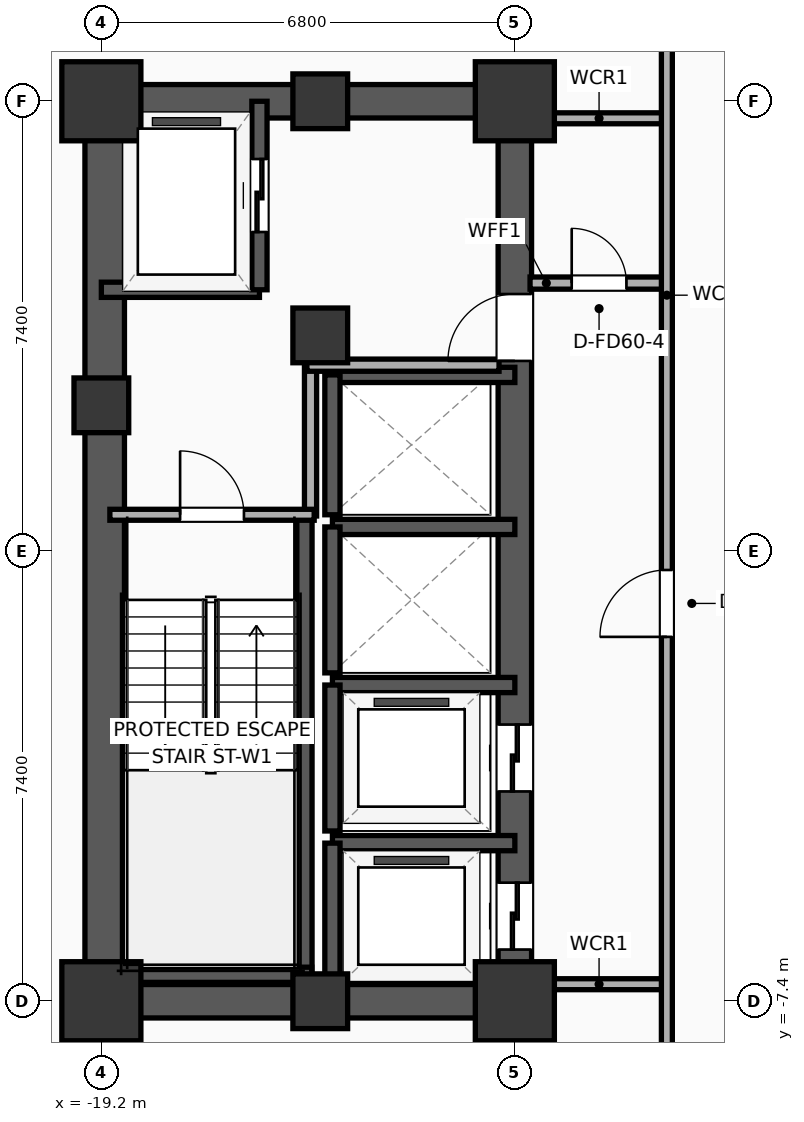
"""IFC4 building model, lengths in metres.
Left out: names, types, materials, properties, quantities, classifications, styles, units other than length and angle.
Written with IfcOpenShell. Run it as: python <this file> out.ifc"""

import sys

from ifc_helpers import new_model, si_unit, direction, frame, frame_2d, origin, origin_2d, place, context, subcontext, project, spatial, rectangle, extrude, element, fill, save


model = new_model("IFC4")
c1 = context("Model", 3, precision=1e-05, world=origin(), true_north=direction((0.0, 1.0)))
c2 = subcontext(c1, "Body", "Model", "MODEL_VIEW")
j1 = project(units=[si_unit("LENGTHUNIT", "METRE"), si_unit("PLANEANGLEUNIT", "RADIAN")], contexts=[c1])
p1 = place(None, origin())
s1 = spatial("IfcSite", under=j1, at=p1, CompositionType="ELEMENT")
p2 = place(p1, origin())
s2 = spatial("IfcBuilding", under=s1, at=p2, CompositionType="ELEMENT")
p3 = place(p2, frame((0.0, 0.0, 128.7)))
s3 = spatial("IfcBuildingStorey", under=s2, at=p3, CompositionType="ELEMENT", Elevation=128.7)
p4 = place(p3, frame((-19.2, -7.4, 0.0), z_axis=(0.0, 0.0, 1.0), x_axis=(1.0, 0.0, 0.0)))
e1 = element("IfcColumn", 1, at=p4, inside=s3, PredefinedType="COLUMN", context=c2, shape_type="SweptSolid", body=[
    extrude(rectangle(XDim=1.3, YDim=1.3, at=origin_2d()), origin(), (0.0, 0.0, 1.0), 3.9),
])
p5 = place(p3, frame((-19.2, 2.4, 0.0), z_axis=(0.0, 0.0, 1.0), x_axis=(1.0, 0.0, 0.0)))
e2 = element("IfcColumn", 2, at=p5, inside=s3, PredefinedType="COLUMN", context=c2, shape_type="SweptSolid", body=[
    extrude(rectangle(XDim=0.9, YDim=0.9, at=origin_2d()), origin(), (0.0, 0.0, 1.0), 3.9),
])
p6 = place(p3, frame((-19.2, 7.4, 0.0), z_axis=(0.0, 0.0, 1.0), x_axis=(1.0, 0.0, 0.0)))
e3 = element("IfcColumn", 3, at=p6, inside=s3, PredefinedType="COLUMN", context=c2, shape_type="SweptSolid", body=[
    extrude(rectangle(XDim=1.3, YDim=1.3, at=origin_2d()), origin(), (0.0, 0.0, 1.0), 3.9),
])
for number, where, z_axis, x_axis in (
    (4, (-15.6, -7.4, 0.0), (0.0, 0.0, 1.0), (1.0, 0.0, 0.0)),
    (5, (-15.6, 7.4, 0.0), (0.0, 0.0, 1.0), (1.0, 0.0, 0.0)),
):
    element("IfcColumn", number, at=place(p3, frame(where, z_axis=z_axis, x_axis=x_axis)), inside=s3, PredefinedType="COLUMN", context=c2, shape_type="SweptSolid", body=[
        extrude(rectangle(XDim=0.9, YDim=0.9, at=origin_2d()), origin(), (0.0, 0.0, 1.0), 3.9),
    ])
p7 = place(p3, frame((-12.4, -7.4, 0.0), z_axis=(0.0, 0.0, 1.0), x_axis=(1.0, 0.0, 0.0)))
e6 = element("IfcColumn", 6, at=p7, inside=s3, PredefinedType="COLUMN", context=c2, shape_type="SweptSolid", body=[
    extrude(rectangle(XDim=1.3, YDim=1.3, at=origin_2d()), origin(), (0.0, 0.0, 1.0), 3.9),
])
p8 = place(p3, frame((-15.6, 3.55, 0.0), z_axis=(0.0, 0.0, 1.0), x_axis=(1.0, 0.0, 0.0)))
e7 = element("IfcColumn", 7, at=p8, inside=s3, PredefinedType="COLUMN", context=c2, shape_type="SweptSolid", body=[
    extrude(rectangle(XDim=0.9, YDim=0.9, at=origin_2d()), origin(), (0.0, 0.0, 1.0), 3.9),
])
p9 = place(p3, frame((-12.4, 7.4, 0.0), z_axis=(0.0, 0.0, 1.0), x_axis=(1.0, 0.0, 0.0)))
e8 = element("IfcColumn", 8, at=p9, inside=s3, PredefinedType="COLUMN", context=c2, shape_type="SweptSolid", body=[
    extrude(rectangle(XDim=1.3, YDim=1.3, at=origin_2d()), origin(), (0.0, 0.0, 1.0), 3.9),
])
for number, where, z_axis, x_axis in (
    (9, (-19.475, -7.4, 0.0), (0.0, 0.0, 1.0), (1.0, 0.0, 0.0)),
    (10, (-19.475, 7.4, 0.0), (0.0, 0.0, 1.0), (1.0, 0.0, 0.0)),
):
    element("IfcWall", number, at=place(p3, frame(where, z_axis=z_axis, x_axis=x_axis)), inside=s3, PredefinedType="SHEAR", context=c2, shape_type="SweptSolid", body=[
        extrude(rectangle(XDim=7.35, YDim=0.55, at=frame_2d((3.675, 0.0))), origin(), (0.0, 0.0, 1.0), 3.65),
    ])
p10 = place(p3, frame((-19.145, -7.4, 0.0), z_axis=(0.0, 0.0, 1.0), x_axis=(0.0, 1.0, 0.0)))
e11 = element("IfcWall", 11, at=p10, inside=s3, PredefinedType="SHEAR", context=c2, shape_type="SweptSolid", body=[
    extrude(rectangle(XDim=14.8, YDim=0.65, at=frame_2d((7.4, 0.0))), origin(), (0.0, 0.0, 1.0), 3.65),
])
p11 = place(p3, frame((-12.4, -7.4, 0.0), z_axis=(0.0, 0.0, 1.0), x_axis=(0.0, 1.0, 0.0)))
e12 = element("IfcWall", 12, at=p11, inside=s3, PredefinedType="SHEAR", context=c2, shape_type="SweptSolid", body=[
    extrude(rectangle(XDim=14.8, YDim=0.55, at=frame_2d((7.4, 0.0))), origin(), (0.0, 0.0, 1.0), 3.65),
])
p12 = place(p11, frame((0.85, 0.0, 0.0)))
e13 = element("IfcOpeningElement", 13, at=p12, cuts=e12, PredefinedType="OPENING", context=c2, shape_type="SweptSolid", body=[
    extrude(rectangle(XDim=1.1, YDim=2.05, at=frame_2d((0.55, 1.025))), frame((0.0, 0.285, 0.0), z_axis=(0.0, -1.0, 0.0), x_axis=(1.0, 0.0, 0.0)), (0.0, 0.0, 1.0), 0.57),
])
p13 = place(p11, frame((3.45, 0.0, 0.0)))
e14 = element("IfcOpeningElement", 14, at=p13, cuts=e12, PredefinedType="OPENING", context=c2, shape_type="SweptSolid", body=[
    extrude(rectangle(XDim=1.1, YDim=2.05, at=frame_2d((0.55, 1.025))), frame((0.0, 0.285, 0.0), z_axis=(0.0, -1.0, 0.0), x_axis=(1.0, 0.0, 0.0)), (0.0, 0.0, 1.0), 0.57),
])
p14 = place(p11, frame((10.53, 0.0, 0.0)))
e15 = element("IfcOpeningElement", 15, at=p14, cuts=e12, PredefinedType="OPENING", context=c2, shape_type="SweptSolid", body=[
    extrude(rectangle(XDim=1.1, YDim=2.05, at=frame_2d((0.55, 1.025))), frame((0.0, 0.285, 0.0), z_axis=(0.0, -1.0, 0.0), x_axis=(1.0, 0.0, 0.0)), (0.0, 0.0, 1.0), 0.57),
])
p15 = place(p3, frame((-15.86, -7.085, 0.0), z_axis=(0.0, 0.0, 1.0), x_axis=(0.0, 1.0, 0.0)))
e16 = element("IfcWall", 16, at=p15, inside=s3, PredefinedType="SOLIDWALL", context=c2, shape_type="SweptSolid", body=[
    extrude(rectangle(XDim=7.685, YDim=0.25, at=frame_2d((3.843, 0.0))), origin(), (0.0, 0.0, 1.0), 3.65),
])
p16 = place(p3, frame((-19.2, -6.965, 0.0), z_axis=(0.0, 0.0, 1.0), x_axis=(1.0, 0.0, 0.0)))
e17 = element("IfcWall", 17, at=p16, inside=s3, PredefinedType="SOLIDWALL", context=c2, shape_type="SweptSolid", body=[
    extrude(rectangle(XDim=3.46, YDim=0.25, at=frame_2d((1.73, 0.0))), origin(), (0.0, 0.0, 1.0), 3.65),
])
p17 = place(p3, frame((-19.2, 4.3, 0.0), z_axis=(0.0, 0.0, 1.0), x_axis=(1.0, 0.0, 0.0)))
e18 = element("IfcWall", 18, at=p17, inside=s3, PredefinedType="SOLIDWALL", context=c2, shape_type="SweptSolid", body=[
    extrude(rectangle(XDim=2.6, YDim=0.25, at=frame_2d((1.3, 0.0))), origin(), (0.0, 0.0, 1.0), 3.65),
])
p18 = place(p3, frame((-16.6, 4.3, 0.0), z_axis=(0.0, 0.0, 1.0), x_axis=(0.0, 1.0, 0.0)))
e19 = element("IfcWall", 19, at=p18, inside=s3, PredefinedType="SOLIDWALL", context=c2, shape_type="SweptSolid", body=[
    extrude(rectangle(XDim=3.1, YDim=0.25, at=frame_2d((1.55, 0.0))), origin(), (0.0, 0.0, 1.0), 3.65),
])
p19 = place(p18, frame((0.95, 0.0, 0.0)))
e20 = element("IfcOpeningElement", 20, at=p19, cuts=e19, PredefinedType="OPENING", context=c2, shape_type="SweptSolid", body=[
    extrude(rectangle(XDim=1.2, YDim=2.05, at=frame_2d((0.6, 1.025))), frame((0.0, 0.135, 0.0), z_axis=(0.0, -1.0, 0.0), x_axis=(1.0, 0.0, 0.0)), (0.0, 0.0, 1.0), 0.27),
])
p20 = place(p3, frame((-12.4, -4.8, 0.0), z_axis=(0.0, 0.0, 1.0), x_axis=(-1.0, 0.0, 0.0)))
e21 = element("IfcWall", 21, at=p20, inside=s3, PredefinedType="SOLIDWALL", context=c2, shape_type="SweptSolid", body=[
    extrude(rectangle(XDim=3.0, YDim=0.25, at=frame_2d((1.5, 0.0))), origin(), (0.0, 0.0, 1.0), 3.65),
])
p21 = place(p3, frame((-15.4, -4.8, 0.0), z_axis=(0.0, 0.0, 1.0), x_axis=(0.0, -1.0, 0.0)))
e22 = element("IfcWall", 22, at=p21, inside=s3, PredefinedType="SOLIDWALL", context=c2, shape_type="SweptSolid", body=[
    extrude(rectangle(XDim=2.6, YDim=0.25, at=frame_2d((1.3, 0.0))), origin(), (0.0, 0.0, 1.0), 3.65),
])
p22 = place(p3, frame((-12.4, -2.2, 0.0), z_axis=(0.0, 0.0, 1.0), x_axis=(-1.0, 0.0, 0.0)))
e23 = element("IfcWall", 23, at=p22, inside=s3, PredefinedType="SOLIDWALL", context=c2, shape_type="SweptSolid", body=[
    extrude(rectangle(XDim=3.0, YDim=0.25, at=frame_2d((1.5, 0.0))), origin(), (0.0, 0.0, 1.0), 3.65),
])
p23 = place(p3, frame((-15.4, -2.2, 0.0), z_axis=(0.0, 0.0, 1.0), x_axis=(0.0, -1.0, 0.0)))
e24 = element("IfcWall", 24, at=p23, inside=s3, PredefinedType="SOLIDWALL", context=c2, shape_type="SweptSolid", body=[
    extrude(rectangle(XDim=2.4, YDim=0.25, at=frame_2d((1.2, 0.0))), origin(), (0.0, 0.0, 1.0), 3.65),
])
p24 = place(p3, frame((-12.4, 0.4, 0.0), z_axis=(0.0, 0.0, 1.0), x_axis=(-1.0, 0.0, 0.0)))
e25 = element("IfcWall", 25, at=p24, inside=s3, PredefinedType="SOLIDWALL", context=c2, shape_type="SweptSolid", body=[
    extrude(rectangle(XDim=3.0, YDim=0.25, at=frame_2d((1.5, 0.0))), origin(), (0.0, 0.0, 1.0), 3.65),
])
p25 = place(p3, frame((-15.4, 0.4, 0.0), z_axis=(0.0, 0.0, 1.0), x_axis=(0.0, -1.0, 0.0)))
e26 = element("IfcWall", 26, at=p25, inside=s3, PredefinedType="SOLIDWALL", context=c2, shape_type="SweptSolid", body=[
    extrude(rectangle(XDim=2.4, YDim=0.25, at=frame_2d((1.2, 0.0))), origin(), (0.0, 0.0, 1.0), 3.65),
])
p26 = place(p3, frame((-12.4, 2.9, 0.0), z_axis=(0.0, 0.0, 1.0), x_axis=(-1.0, 0.0, 0.0)))
e27 = element("IfcWall", 27, at=p26, inside=s3, PredefinedType="SOLIDWALL", context=c2, shape_type="SweptSolid", body=[
    extrude(rectangle(XDim=3.0, YDim=0.25, at=frame_2d((1.5, 0.0))), origin(), (0.0, 0.0, 1.0), 3.65),
])
p27 = place(p3, frame((-15.4, 2.9, 0.0), z_axis=(0.0, 0.0, 1.0), x_axis=(0.0, -1.0, 0.0)))
e28 = element("IfcWall", 28, at=p27, inside=s3, PredefinedType="SOLIDWALL", context=c2, shape_type="SweptSolid", body=[
    extrude(rectangle(XDim=2.3, YDim=0.25, at=frame_2d((1.15, 0.0))), origin(), (0.0, 0.0, 1.0), 3.65),
])
p28 = place(p3, frame((-15.76, 0.58, 0.0), z_axis=(0.0, 0.0, 1.0), x_axis=(0.0, 1.0, 0.0)))
e29 = element("IfcWall", 29, at=p28, inside=s3, PredefinedType="PARTITIONING", context=c2, shape_type="SweptSolid", body=[
    extrude(rectangle(XDim=2.52, YDim=0.2, at=frame_2d((1.26, 0.0))), origin(), (0.0, 0.0, 1.0), 3.65),
])
p29 = place(p3, frame((-15.82, 3.06, 0.0), z_axis=(0.0, 0.0, 1.0), x_axis=(1.0, 0.0, 0.0)))
e30 = element("IfcWall", 30, at=p29, inside=s3, PredefinedType="PARTITIONING", context=c2, shape_type="SweptSolid", body=[
    extrude(rectangle(XDim=3.16, YDim=0.2, at=frame_2d((1.58, 0.0))), origin(), (0.0, 0.0, 1.0), 3.65),
])
p30 = place(p3, frame((-19.06, 0.6, 0.0), z_axis=(0.0, 0.0, 1.0), x_axis=(1.0, 0.0, 0.0)))
e31 = element("IfcWall", 31, at=p30, inside=s3, PredefinedType="PARTITIONING", context=c2, shape_type="SweptSolid", body=[
    extrude(rectangle(XDim=3.36, YDim=0.18, at=frame_2d((1.68, 0.0))), origin(), (0.0, 0.0, 1.0), 3.65),
])
p31 = place(p30, frame((1.155, 0.0, 0.0)))
e32 = element("IfcOpeningElement", 32, at=p31, cuts=e31, PredefinedType="OPENING", context=c2, shape_type="SweptSolid", body=[
    extrude(rectangle(XDim=1.05, YDim=2.05, at=frame_2d((0.525, 1.025))), frame((0.0, 0.1, 0.0), z_axis=(0.0, -1.0, 0.0), x_axis=(1.0, 0.0, 0.0)), (0.0, 0.0, 1.0), 0.2),
])
p32 = place(p3, frame((-12.15, 4.41, 0.0), z_axis=(0.0, 0.0, 1.0), x_axis=(1.0, 0.0, 0.0)))
e33 = element("IfcWall", 33, at=p32, inside=s3, PredefinedType="PARTITIONING", context=c2, shape_type="SweptSolid", body=[
    extrude(rectangle(XDim=2.27, YDim=0.2, at=frame_2d((1.135, 0.0))), origin(), (0.0, 0.0, 1.0), 3.65),
])
p33 = place(p32, frame((0.685, 0.0, 0.0)))
e34 = element("IfcOpeningElement", 34, at=p33, cuts=e33, PredefinedType="OPENING", context=c2, shape_type="SweptSolid", body=[
    extrude(rectangle(XDim=0.9, YDim=2.05, at=frame_2d((0.45, 1.025))), frame((0.0, 0.11, 0.0), z_axis=(0.0, -1.0, 0.0), x_axis=(1.0, 0.0, 0.0)), (0.0, 0.0, 1.0), 0.22),
])
for number, where, z_axis, x_axis in (
    (35, (-12.15, 7.12, 0.0), (0.0, 0.0, 1.0), (1.0, 0.0, 0.0)),
    (36, (-12.15, -7.12, 0.0), (0.0, 0.0, 1.0), (1.0, 0.0, 0.0)),
):
    element("IfcWall", number, at=place(p3, frame(where, z_axis=z_axis, x_axis=x_axis)), inside=s3, PredefinedType="PARTITIONING", context=c2, shape_type="SweptSolid", body=[
        extrude(rectangle(XDim=2.27, YDim=0.18, at=frame_2d((1.135, 0.0))), origin(), (0.0, 0.0, 1.0), 3.65),
    ])
p34 = place(p3, frame((-9.9, -8.58, 0.0), z_axis=(0.0, 0.0, 1.0), x_axis=(0.0, 1.0, 0.0)))
e37 = element("IfcWall", 37, at=p34, inside=s3, PredefinedType="PARTITIONING", context=c2, shape_type="SweptSolid", body=[
    extrude(rectangle(XDim=17.16, YDim=0.18, at=frame_2d((8.58, 0.0))), origin(), (0.0, 0.0, 1.0), 3.65),
])
p35 = place(p34, frame((7.172, 0.0, 0.0)))
e38 = element("IfcOpeningElement", 38, at=p35, cuts=e37, PredefinedType="OPENING", context=c2, shape_type="SweptSolid", body=[
    extrude(rectangle(XDim=1.1, YDim=2.05, at=frame_2d((0.55, 1.025))), frame((0.0, 0.1, 0.0), z_axis=(0.0, -1.0, 0.0), x_axis=(1.0, 0.0, 0.0)), (0.0, 0.0, 1.0), 0.2),
])
p36 = place(p19, origin())
e39 = element("IfcDoor", 39, at=p36, inside=s3, OperationType="SLIDING_TO_LEFT", PredefinedType="DOOR", context=c2, shape_type="SweptSolid", body=[
    extrude(rectangle(XDim=1.2, YDim=2.05, at=frame_2d((0.6, 1.025))), frame((0.0, 0.025, 0.0), z_axis=(0.0, -1.0, 0.0), x_axis=(1.0, 0.0, 0.0)), (0.0, 0.0, 1.0), 0.05),
])
fill(e20, e39)
p37 = place(p12, origin())
e40 = element("IfcDoor", 40, at=p37, inside=s3, OperationType="SLIDING_TO_LEFT", PredefinedType="DOOR", context=c2, shape_type="SweptSolid", body=[
    extrude(rectangle(XDim=1.1, YDim=2.05, at=frame_2d((0.55, 1.025))), frame((0.0, 0.025, 0.0), z_axis=(0.0, -1.0, 0.0), x_axis=(1.0, 0.0, 0.0)), (0.0, 0.0, 1.0), 0.05),
])
fill(e13, e40)
p38 = place(p13, origin())
e41 = element("IfcDoor", 41, at=p38, inside=s3, OperationType="SLIDING_TO_LEFT", PredefinedType="DOOR", context=c2, shape_type="SweptSolid", body=[
    extrude(rectangle(XDim=1.1, YDim=2.05, at=frame_2d((0.55, 1.025))), frame((0.0, 0.025, 0.0), z_axis=(0.0, -1.0, 0.0), x_axis=(1.0, 0.0, 0.0)), (0.0, 0.0, 1.0), 0.05),
])
fill(e14, e41)
p39 = place(p31, origin())
e42 = element("IfcDoor", 42, at=p39, inside=s3, OperationType="SINGLE_SWING_LEFT", PredefinedType="DOOR", context=c2, shape_type="SweptSolid", body=[
    extrude(rectangle(XDim=1.05, YDim=2.05, at=frame_2d((0.525, 1.025))), frame((0.0, 0.025, 0.0), z_axis=(0.0, -1.0, 0.0), x_axis=(1.0, 0.0, 0.0)), (0.0, 0.0, 1.0), 0.05),
])
fill(e32, e42)
p40 = place(p33, origin())
e43 = element("IfcDoor", 43, at=p40, inside=s3, OperationType="SINGLE_SWING_LEFT", PredefinedType="DOOR", context=c2, shape_type="SweptSolid", body=[
    extrude(rectangle(XDim=0.9, YDim=2.05, at=frame_2d((0.45, 1.025))), frame((0.0, 0.025, 0.0), z_axis=(0.0, -1.0, 0.0), x_axis=(1.0, 0.0, 0.0)), (0.0, 0.0, 1.0), 0.05),
])
fill(e34, e43)
p41 = place(p35, origin())
e44 = element("IfcDoor", 44, at=p41, inside=s3, OperationType="SINGLE_SWING_LEFT", PredefinedType="DOOR", context=c2, shape_type="SweptSolid", body=[
    extrude(rectangle(XDim=1.1, YDim=2.05, at=frame_2d((0.55, 1.025))), frame((0.0, 0.025, 0.0), z_axis=(0.0, -1.0, 0.0), x_axis=(1.0, 0.0, 0.0)), (0.0, 0.0, 1.0), 0.05),
])
fill(e38, e44)
p42 = place(p14, origin())
e45 = element("IfcDoor", 45, at=p42, inside=s3, OperationType="SINGLE_SWING_LEFT", PredefinedType="DOOR", context=c2, shape_type="SweptSolid", body=[
    extrude(rectangle(XDim=1.1, YDim=2.05, at=frame_2d((0.55, 1.025))), frame((0.0, 0.025, 0.0), z_axis=(0.0, -1.0, 0.0), x_axis=(1.0, 0.0, 0.0)), (0.0, 0.0, 1.0), 0.05),
])
fill(e15, e45)
save(model, sys.argv[1])
